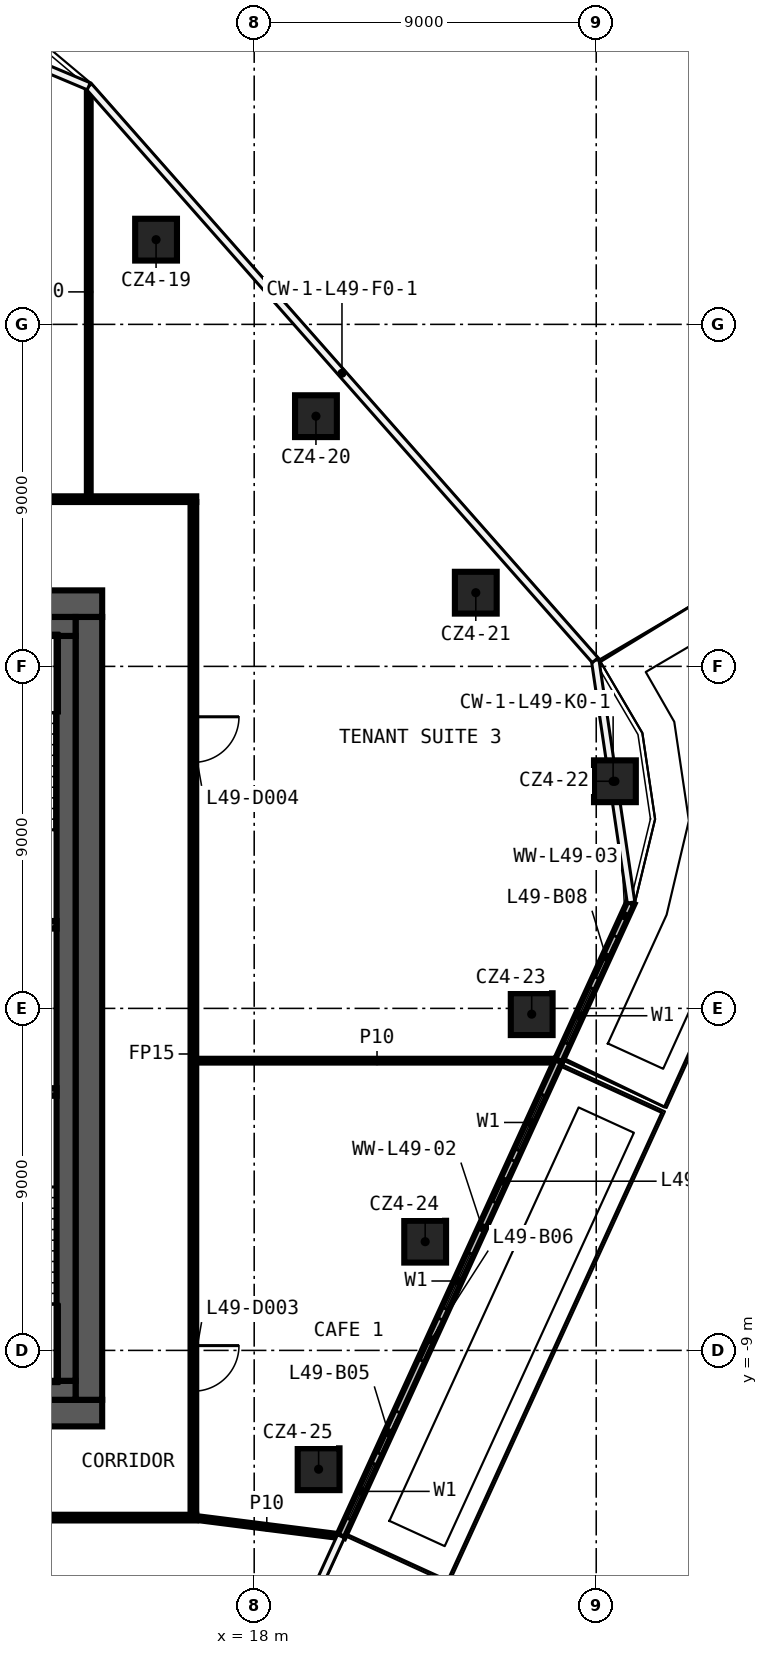
"""IFC4 building model, lengths in metres.
Left out: names, types, materials, properties, quantities, classifications, styles, units other than length and angle.
Written with IfcOpenShell. Run it as: python <this file> out.ifc"""

import sys

from ifc_helpers import new_model, si_unit, direction, frame, frame_2d, origin, origin_2d, place, context, subcontext, project, spatial, rectangle, extrude, element, fill, save


model = new_model("IFC4")
c1 = context("Model", 3, precision=1e-05, world=origin(), true_north=direction((0.0, 1.0)))
c2 = subcontext(c1, "Body", "Model", "MODEL_VIEW")
j1 = project(units=[si_unit("LENGTHUNIT", "METRE"), si_unit("PLANEANGLEUNIT", "RADIAN")], contexts=[c1])
p1 = place(None, origin())
s1 = spatial("IfcSite", under=j1, at=p1, CompositionType="ELEMENT")
p2 = place(p1, origin())
s2 = spatial("IfcBuilding", under=s1, at=p2, CompositionType="ELEMENT")
p3 = place(p2, frame((0.0, 0.0, 237.0)))
s3 = spatial("IfcBuildingStorey", under=s2, at=p3, CompositionType="ELEMENT", Elevation=237.0)
for number, where, z_axis, x_axis in (
    (1, (15.418, 20.229, 0.0), (0.0, 0.0, 1.0), (1.0, 0.0, 0.0)),
    (2, (19.625, 15.584, 0.0), (0.0, 0.0, 1.0), (1.0, 0.0, 0.0)),
    (3, (23.831, 10.939, 0.0), (0.0, 0.0, 1.0), (1.0, 0.0, 0.0)),
    (4, (27.492, 5.977, 0.0), (0.0, 0.0, 1.0), (1.0, 0.0, 0.0)),
    (5, (25.302, -0.152, 0.0), (0.0, 0.0, 1.0), (1.0, 0.0, 0.0)),
    (6, (22.499, -6.139, 0.0), (0.0, 0.0, 1.0), (1.0, 0.0, 0.0)),
    (7, (19.695, -12.127, 0.0), (0.0, 0.0, 1.0), (1.0, 0.0, 0.0)),
):
    element("IfcColumn", number, at=place(p3, frame(where, z_axis=z_axis, x_axis=x_axis)), inside=s3, PredefinedType="COLUMN", context=c2, shape_type="SweptSolid", body=[
        extrude(rectangle(XDim=1.1, YDim=1.1, at=origin_2d()), origin(), (0.0, 0.0, 1.0), 3.82),
    ])
p4 = place(p3, frame((16.475, -13.4, 0.0), z_axis=(0.0, 0.0, 1.0), x_axis=(-1.0, 0.0, 0.0)))
e8 = element("IfcWall", 8, at=p4, inside=s3, PredefinedType="PARTITIONING", context=c2, shape_type="SweptSolid", body=[
    extrude(rectangle(XDim=18.55, YDim=0.15, at=frame_2d((9.275, 0.0))), origin(), (0.0, 0.0, 1.0), 3.82),
])
p5 = place(p4, frame((7.367, 0.0, 0.0)))
e9 = element("IfcOpeningElement", 9, at=p5, cuts=e8, PredefinedType="OPENING", context=c2, shape_type="SweptSolid", body=[
    extrude(rectangle(XDim=1.2, YDim=2.1, at=frame_2d((0.6, 1.05))), frame((0.0, 0.085, 0.0), z_axis=(0.0, -1.0, 0.0), x_axis=(1.0, 0.0, 0.0)), (0.0, 0.0, 1.0), 0.17),
])
p6 = place(p3, frame((16.475, -1.376, 0.0), z_axis=(0.0, 0.0, 1.0), x_axis=(1.0, 0.0, 0.0)))
e10 = element("IfcWall", 10, at=p6, inside=s3, PredefinedType="PARTITIONING", context=c2, shape_type="SweptSolid", body=[
    extrude(rectangle(XDim=9.514, YDim=0.1, at=frame_2d((4.757, 0.0))), origin(), (0.0, 0.0, 1.0), 3.82),
])
p7 = place(p3, frame((-2.075, 13.4, 0.0), z_axis=(0.0, 0.0, 1.0), x_axis=(1.0, 0.0, 0.0)))
e11 = element("IfcWall", 11, at=p7, inside=s3, PredefinedType="PARTITIONING", context=c2, shape_type="SweptSolid", body=[
    extrude(rectangle(XDim=18.55, YDim=0.15, at=frame_2d((9.275, 0.0))), origin(), (0.0, 0.0, 1.0), 3.82),
])
p8 = place(p7, frame((2.91, 0.0, 0.0)))
e12 = element("IfcOpeningElement", 12, at=p8, cuts=e11, PredefinedType="OPENING", context=c2, shape_type="SweptSolid", body=[
    extrude(rectangle(XDim=1.2, YDim=2.1, at=frame_2d((0.6, 1.05))), frame((0.0, 0.085, 0.0), z_axis=(0.0, -1.0, 0.0), x_axis=(1.0, 0.0, 0.0)), (0.0, 0.0, 1.0), 0.17),
])
p9 = place(p7, frame((7.894, 0.0, 0.0)))
e13 = element("IfcOpeningElement", 13, at=p9, cuts=e11, PredefinedType="OPENING", context=c2, shape_type="SweptSolid", body=[
    extrude(rectangle(XDim=1.2, YDim=2.1, at=frame_2d((0.6, 1.05))), frame((0.0, 0.085, 0.0), z_axis=(0.0, -1.0, 0.0), x_axis=(1.0, 0.0, 0.0)), (0.0, 0.0, 1.0), 0.17),
])
p10 = place(p3, frame((16.4, 13.325, 0.0), z_axis=(0.0, 0.0, 1.0), x_axis=(0.0, -1.0, 0.0)))
e14 = element("IfcWall", 14, at=p10, inside=s3, PredefinedType="PARTITIONING", context=c2, shape_type="SweptSolid", body=[
    extrude(rectangle(XDim=26.65, YDim=0.15, at=frame_2d((13.325, 0.0))), origin(), (0.0, 0.0, 1.0), 3.82),
])
p11 = place(p10, frame((22.199, 0.0, 0.0)))
e15 = element("IfcOpeningElement", 15, at=p11, cuts=e14, PredefinedType="OPENING", context=c2, shape_type="SweptSolid", body=[
    extrude(rectangle(XDim=1.2, YDim=2.1, at=frame_2d((0.6, 1.05))), frame((0.0, 0.085, 0.0), z_axis=(0.0, -1.0, 0.0), x_axis=(1.0, 0.0, 0.0)), (0.0, 0.0, 1.0), 0.17),
])
p12 = place(p10, frame((5.651, 0.0, 0.0)))
e16 = element("IfcOpeningElement", 16, at=p12, cuts=e14, PredefinedType="OPENING", context=c2, shape_type="SweptSolid", body=[
    extrude(rectangle(XDim=1.2, YDim=2.1, at=frame_2d((0.6, 1.05))), frame((0.0, 0.085, 0.0), z_axis=(0.0, -1.0, 0.0), x_axis=(1.0, 0.0, 0.0)), (0.0, 0.0, 1.0), 0.17),
])
p13 = place(p3, frame((13.647, 13.475, 0.0), z_axis=(0.0, 0.0, 1.0), x_axis=(0.0, 1.0, 0.0)))
e17 = element("IfcWall", 17, at=p13, inside=s3, PredefinedType="PARTITIONING", context=c2, shape_type="SweptSolid", body=[
    extrude(rectangle(XDim=10.76, YDim=0.1, at=frame_2d((5.38, 0.0))), origin(), (0.0, 0.0, 1.0), 3.82),
])
p14 = place(p3, frame((16.4, -13.4, 0.0), z_axis=(0.0, 0.0, 1.0), x_axis=(0.992073977013, -0.125655179493, 0.0)))
e18 = element("IfcWall", 18, at=p14, inside=s3, PredefinedType="PARTITIONING", context=c2, shape_type="SweptSolid", body=[
    extrude(rectangle(XDim=3.894, YDim=0.1, at=frame_2d((1.947, 0.0))), origin(), (0.0, 0.0, 1.0), 3.82),
])
p15 = place(p3, frame((20.283, -13.892, 0.0), z_axis=(0.0, 0.0, 1.0), x_axis=(0.416106802435, 0.909315747674, 0.0)))
e19 = element("IfcWall", 19, at=p15, inside=s3, PredefinedType="SOLIDWALL", context=c2, shape_type="SweptSolid", body=[
    extrude(rectangle(XDim=13.765, YDim=0.2, at=frame_2d((6.882, 0.0))), origin(), (0.0, 0.0, 1.0), 3.75),
])
p16 = place(p15, frame((0.5, 0.0, 0.6)))
e20 = element("IfcOpeningElement", 20, at=p16, cuts=e19, PredefinedType="OPENING", context=c2, shape_type="SweptSolid", body=[
    extrude(rectangle(XDim=1.6, YDim=2.4, at=frame_2d((0.8, 1.2))), frame((0.0, 0.11, 0.0), z_axis=(0.0, -1.0, 0.0), x_axis=(1.0, 0.0, 0.0)), (0.0, 0.0, 1.0), 0.22),
])
p17 = place(p15, frame((2.4, 0.0, 0.0)))
e21 = element("IfcOpeningElement", 21, at=p17, cuts=e19, PredefinedType="OPENING", context=c2, shape_type="SweptSolid", body=[
    extrude(rectangle(XDim=1.2, YDim=2.4, at=frame_2d((0.6, 1.2))), frame((0.0, 0.11, 0.0), z_axis=(0.0, -1.0, 0.0), x_axis=(1.0, 0.0, 0.0)), (0.0, 0.0, 1.0), 0.22),
])
p18 = place(p15, frame((6.588, 0.0, 0.6)))
e22 = element("IfcOpeningElement", 22, at=p18, cuts=e19, PredefinedType="OPENING", context=c2, shape_type="SweptSolid", body=[
    extrude(rectangle(XDim=1.6, YDim=2.4, at=frame_2d((0.8, 1.2))), frame((0.0, 0.11, 0.0), z_axis=(0.0, -1.0, 0.0), x_axis=(1.0, 0.0, 0.0)), (0.0, 0.0, 1.0), 0.22),
])
p19 = place(p15, frame((5.088, 0.0, 0.0)))
e23 = element("IfcOpeningElement", 23, at=p19, cuts=e19, PredefinedType="OPENING", context=c2, shape_type="SweptSolid", body=[
    extrude(rectangle(XDim=1.2, YDim=2.4, at=frame_2d((0.6, 1.2))), frame((0.0, 0.11, 0.0), z_axis=(0.0, -1.0, 0.0), x_axis=(1.0, 0.0, 0.0)), (0.0, 0.0, 1.0), 0.22),
])
p20 = place(p15, frame((11.176, 0.0, 0.6)))
e24 = element("IfcOpeningElement", 24, at=p20, cuts=e19, PredefinedType="OPENING", context=c2, shape_type="SweptSolid", body=[
    extrude(rectangle(XDim=1.6, YDim=2.4, at=frame_2d((0.8, 1.2))), frame((0.0, 0.11, 0.0), z_axis=(0.0, -1.0, 0.0), x_axis=(1.0, 0.0, 0.0)), (0.0, 0.0, 1.0), 0.22),
])
p21 = place(p15, frame((9.676, 0.0, 0.0)))
e25 = element("IfcOpeningElement", 25, at=p21, cuts=e19, PredefinedType="OPENING", context=c2, shape_type="SweptSolid", body=[
    extrude(rectangle(XDim=1.2, YDim=2.4, at=frame_2d((0.6, 1.2))), frame((0.0, 0.11, 0.0), z_axis=(0.0, -1.0, 0.0), x_axis=(1.0, 0.0, 0.0)), (0.0, 0.0, 1.0), 0.22),
])
p22 = place(p3, frame((26.011, -1.376, 0.0), z_axis=(0.0, 0.0, 1.0), x_axis=(0.416127690122, 0.909306189088, 0.0)))
e26 = element("IfcWall", 26, at=p22, inside=s3, PredefinedType="SOLIDWALL", context=c2, shape_type="SweptSolid", body=[
    extrude(rectangle(XDim=4.579, YDim=0.2, at=frame_2d((2.289, 0.0))), origin(), (0.0, 0.0, 1.0), 3.75),
])
p23 = place(p22, frame((0.5, 0.0, 0.6)))
e27 = element("IfcOpeningElement", 27, at=p23, cuts=e26, PredefinedType="OPENING", context=c2, shape_type="SweptSolid", body=[
    extrude(rectangle(XDim=1.6, YDim=2.4, at=frame_2d((0.8, 1.2))), frame((0.0, 0.11, 0.0), z_axis=(0.0, -1.0, 0.0), x_axis=(1.0, 0.0, 0.0)), (0.0, 0.0, 1.0), 0.22),
])
p24 = place(p22, frame((2.4, 0.0, 0.0)))
e28 = element("IfcOpeningElement", 28, at=p24, cuts=e26, PredefinedType="OPENING", context=c2, shape_type="SweptSolid", body=[
    extrude(rectangle(XDim=1.2, YDim=2.4, at=frame_2d((0.6, 1.2))), frame((0.0, 0.11, 0.0), z_axis=(0.0, -1.0, 0.0), x_axis=(1.0, 0.0, 0.0)), (0.0, 0.0, 1.0), 0.22),
])
p25 = place(p3, frame((-14.0, 10.65, 0.0), z_axis=(0.0, 0.0, 1.0), x_axis=(1.0, 0.0, 0.0)))
e29 = element("IfcWall", 29, at=p25, inside=s3, PredefinedType="SHEAR", context=c2, shape_type="SweptSolid", body=[
    extrude(rectangle(XDim=28.0, YDim=0.7, at=frame_2d((14.0, 0.0))), origin(), (0.0, 0.0, 1.0), 3.82),
])
p26 = place(p25, frame((15.9, 0.0, 0.0)))
e30 = element("IfcOpeningElement", 30, at=p26, cuts=e29, PredefinedType="OPENING", context=c2, shape_type="SweptSolid", body=[
    extrude(rectangle(XDim=1.6, YDim=2.1, at=frame_2d((0.8, 1.05))), frame((0.0, 0.36, 0.0), z_axis=(0.0, -1.0, 0.0), x_axis=(1.0, 0.0, 0.0)), (0.0, 0.0, 1.0), 0.72),
])
p27 = place(p3, frame((14.0, -10.65, 0.0), z_axis=(0.0, 0.0, 1.0), x_axis=(-1.0, 0.0, 0.0)))
e31 = element("IfcWall", 31, at=p27, inside=s3, PredefinedType="SHEAR", context=c2, shape_type="SweptSolid", body=[
    extrude(rectangle(XDim=28.0, YDim=0.7, at=frame_2d((14.0, 0.0))), origin(), (0.0, 0.0, 1.0), 3.82),
])
p28 = place(p27, frame((5.1, 0.0, 0.0)))
e32 = element("IfcOpeningElement", 32, at=p28, cuts=e31, PredefinedType="OPENING", context=c2, shape_type="SweptSolid", body=[
    extrude(rectangle(XDim=1.6, YDim=2.1, at=frame_2d((0.8, 1.05))), frame((0.0, 0.36, 0.0), z_axis=(0.0, -1.0, 0.0), x_axis=(1.0, 0.0, 0.0)), (0.0, 0.0, 1.0), 0.72),
])
p29 = place(p3, frame((13.65, 10.3, 0.0), z_axis=(0.0, 0.0, 1.0), x_axis=(0.0, -1.0, 0.0)))
e33 = element("IfcWall", 33, at=p29, inside=s3, PredefinedType="SHEAR", context=c2, shape_type="SweptSolid", body=[
    extrude(rectangle(XDim=20.6, YDim=0.7, at=frame_2d((10.3, 0.0))), origin(), (0.0, 0.0, 1.0), 3.82),
])
p30 = place(p3, frame((3.9, 10.05, 0.0), z_axis=(0.0, 0.0, 1.0), x_axis=(1.0, 0.0, 0.0)))
e34 = element("IfcWall", 34, at=p30, inside=s3, PredefinedType="SHEAR", context=c2, shape_type="SweptSolid", body=[
    extrude(rectangle(XDim=9.4, YDim=0.5, at=frame_2d((4.7, 0.0))), origin(), (0.0, 0.0, 1.0), 3.82),
])
p31 = place(p3, frame((13.3, -10.05, 0.0), z_axis=(0.0, 0.0, 1.0), x_axis=(-1.0, 0.0, 0.0)))
e35 = element("IfcWall", 35, at=p31, inside=s3, PredefinedType="SHEAR", context=c2, shape_type="SweptSolid", body=[
    extrude(rectangle(XDim=4.0, YDim=0.5, at=frame_2d((2.0, 0.0))), origin(), (0.0, 0.0, 1.0), 3.82),
])
p32 = place(p3, frame((13.05, 9.8, 0.0), z_axis=(0.0, 0.0, 1.0), x_axis=(0.0, -1.0, 0.0)))
e36 = element("IfcWall", 36, at=p32, inside=s3, PredefinedType="SHEAR", context=c2, shape_type="SweptSolid", body=[
    extrude(rectangle(XDim=19.6, YDim=0.5, at=frame_2d((9.8, 0.0))), origin(), (0.0, 0.0, 1.0), 3.82),
])
for number, where, z_axis, x_axis in (
    (37, (9.45, 2.2, 0.0), (0.0, 0.0, 1.0), (1.0, 0.0, 0.0)),
    (38, (9.45, -2.2, 0.0), (0.0, 0.0, 1.0), (1.0, 0.0, 0.0)),
):
    element("IfcWall", number, at=place(p3, frame(where, z_axis=z_axis, x_axis=x_axis)), inside=s3, PredefinedType="SHEAR", context=c2, shape_type="SweptSolid", body=[
        extrude(rectangle(XDim=3.35, YDim=0.2, at=frame_2d((1.675, 0.0))), origin(), (0.0, 0.0, 1.0), 3.82),
    ])
p33 = place(p11, origin())
e39 = element("IfcDoor", 39, at=p33, inside=s3, OperationType="SINGLE_SWING_RIGHT", PredefinedType="DOOR", context=c2, shape_type="SweptSolid", body=[
    extrude(rectangle(XDim=1.2, YDim=2.1, at=frame_2d((0.6, 1.05))), frame((0.0, 0.025, 0.0), z_axis=(0.0, -1.0, 0.0), x_axis=(1.0, 0.0, 0.0)), (0.0, 0.0, 1.0), 0.05),
])
fill(e15, e39)
p34 = place(p12, origin())
e40 = element("IfcDoor", 40, at=p34, inside=s3, OperationType="SINGLE_SWING_LEFT", PredefinedType="DOOR", context=c2, shape_type="SweptSolid", body=[
    extrude(rectangle(XDim=1.2, YDim=2.1, at=frame_2d((0.6, 1.05))), frame((0.0, 0.025, 0.0), z_axis=(0.0, -1.0, 0.0), x_axis=(1.0, 0.0, 0.0)), (0.0, 0.0, 1.0), 0.05),
])
fill(e16, e40)
p35 = place(p16, origin())
e41 = element("IfcWindow", 41, at=p35, inside=s3, PartitioningType="SINGLE_PANEL", PredefinedType="WINDOW", context=c2, shape_type="SweptSolid", body=[
    extrude(rectangle(XDim=1.6, YDim=2.4, at=frame_2d((0.8, 1.2))), frame((0.0, 0.03, 0.0), z_axis=(0.0, -1.0, 0.0), x_axis=(1.0, 0.0, 0.0)), (0.0, 0.0, 1.0), 0.06),
])
fill(e20, e41)
p36 = place(p17, origin())
e42 = element("IfcDoor", 42, at=p36, inside=s3, OperationType="SLIDING_TO_LEFT", PredefinedType="DOOR", context=c2, shape_type="SweptSolid", body=[
    extrude(rectangle(XDim=1.2, YDim=2.4, at=frame_2d((0.6, 1.2))), frame((0.0, 0.025, 0.0), z_axis=(0.0, -1.0, 0.0), x_axis=(1.0, 0.0, 0.0)), (0.0, 0.0, 1.0), 0.05),
])
fill(e21, e42)
p37 = place(p18, origin())
e43 = element("IfcWindow", 43, at=p37, inside=s3, PartitioningType="SINGLE_PANEL", PredefinedType="WINDOW", context=c2, shape_type="SweptSolid", body=[
    extrude(rectangle(XDim=1.6, YDim=2.4, at=frame_2d((0.8, 1.2))), frame((0.0, 0.03, 0.0), z_axis=(0.0, -1.0, 0.0), x_axis=(1.0, 0.0, 0.0)), (0.0, 0.0, 1.0), 0.06),
])
fill(e22, e43)
p38 = place(p19, origin())
e44 = element("IfcDoor", 44, at=p38, inside=s3, OperationType="SLIDING_TO_LEFT", PredefinedType="DOOR", context=c2, shape_type="SweptSolid", body=[
    extrude(rectangle(XDim=1.2, YDim=2.4, at=frame_2d((0.6, 1.2))), frame((0.0, 0.025, 0.0), z_axis=(0.0, -1.0, 0.0), x_axis=(1.0, 0.0, 0.0)), (0.0, 0.0, 1.0), 0.05),
])
fill(e23, e44)
p39 = place(p20, origin())
e45 = element("IfcWindow", 45, at=p39, inside=s3, PartitioningType="SINGLE_PANEL", PredefinedType="WINDOW", context=c2, shape_type="SweptSolid", body=[
    extrude(rectangle(XDim=1.6, YDim=2.4, at=frame_2d((0.8, 1.2))), frame((0.0, 0.03, 0.0), z_axis=(0.0, -1.0, 0.0), x_axis=(1.0, 0.0, 0.0)), (0.0, 0.0, 1.0), 0.06),
])
fill(e24, e45)
p40 = place(p21, origin())
e46 = element("IfcDoor", 46, at=p40, inside=s3, OperationType="SLIDING_TO_LEFT", PredefinedType="DOOR", context=c2, shape_type="SweptSolid", body=[
    extrude(rectangle(XDim=1.2, YDim=2.4, at=frame_2d((0.6, 1.2))), frame((0.0, 0.025, 0.0), z_axis=(0.0, -1.0, 0.0), x_axis=(1.0, 0.0, 0.0)), (0.0, 0.0, 1.0), 0.05),
])
fill(e25, e46)
p41 = place(p23, origin())
e47 = element("IfcWindow", 47, at=p41, inside=s3, PartitioningType="SINGLE_PANEL", PredefinedType="WINDOW", context=c2, shape_type="SweptSolid", body=[
    extrude(rectangle(XDim=1.6, YDim=2.4, at=frame_2d((0.8, 1.2))), frame((0.0, 0.03, 0.0), z_axis=(0.0, -1.0, 0.0), x_axis=(1.0, 0.0, 0.0)), (0.0, 0.0, 1.0), 0.06),
])
fill(e27, e47)
p42 = place(p24, origin())
e48 = element("IfcDoor", 48, at=p42, inside=s3, OperationType="SLIDING_TO_LEFT", PredefinedType="DOOR", context=c2, shape_type="SweptSolid", body=[
    extrude(rectangle(XDim=1.2, YDim=2.4, at=frame_2d((0.6, 1.2))), frame((0.0, 0.025, 0.0), z_axis=(0.0, -1.0, 0.0), x_axis=(1.0, 0.0, 0.0)), (0.0, 0.0, 1.0), 0.05),
])
fill(e28, e48)
save(model, sys.argv[1])
